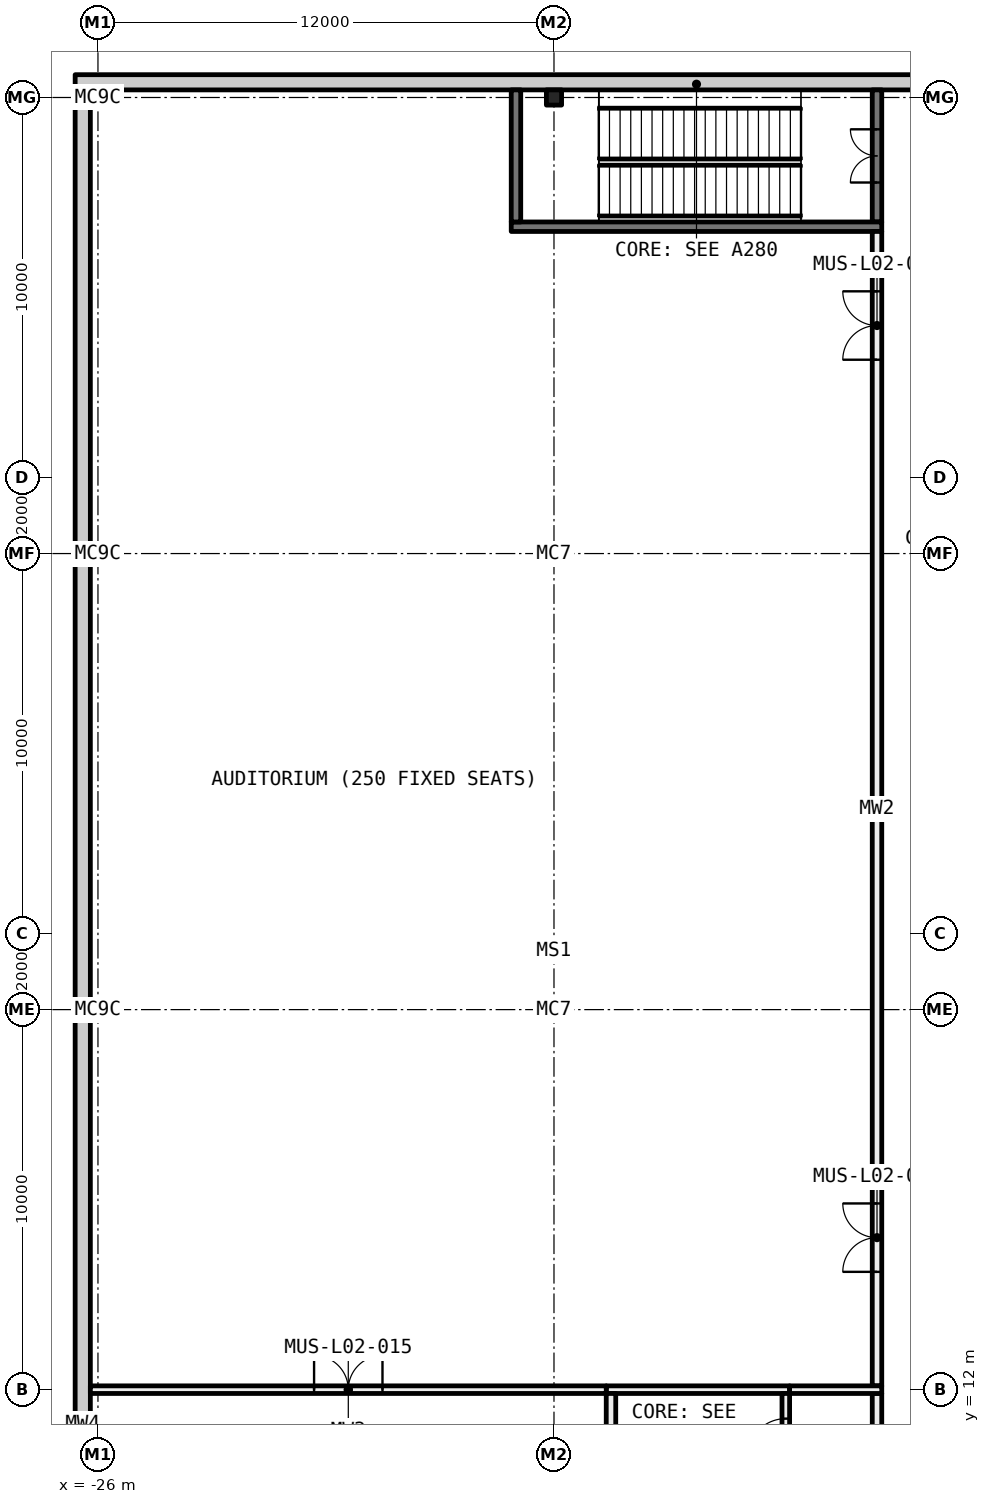
"""IFC4 building model, lengths in metres.
Left out: names, types, materials, properties, quantities, classifications, styles, units other than length and angle.
Written with IfcOpenShell. Run it as: python <this file> out.ifc"""

import sys

from ifc_helpers import new_model, si_unit, direction, frame, frame_2d, origin, origin_2d, place, context, subcontext, project, spatial, rectangle, i_section, extrude, element, fill, save


model = new_model("IFC4")
c1 = context("Model", 3, precision=1e-05, world=origin(), true_north=direction((0.0, 1.0)))
c2 = subcontext(c1, "Body", "Model", "MODEL_VIEW")
j1 = project(units=[si_unit("LENGTHUNIT", "METRE"), si_unit("PLANEANGLEUNIT", "RADIAN")], contexts=[c1])
p1 = place(None, origin())
s1 = spatial("IfcSite", under=j1, at=p1, CompositionType="ELEMENT")
p2 = place(p1, origin())
s2 = spatial("IfcBuilding", under=s1, at=p2, CompositionType="ELEMENT")
p3 = place(p2, frame((0.0, 0.0, 12.0)))
s3 = spatial("IfcBuildingStorey", under=s2, at=p3, CompositionType="ELEMENT", Elevation=12.0)
for number, where, z_axis, x_axis in (
    (1, (-26.0, 22.0, 0.0), (0.0, 0.0, 1.0), (1.0, 0.0, 0.0)),
    (2, (-26.0, 34.0, 0.0), (0.0, 0.0, 1.0), (1.0, 0.0, 0.0)),
    (3, (-26.0, 46.0, 0.0), (0.0, 0.0, 1.0), (1.0, 0.0, 0.0)),
):
    element("IfcColumn", number, at=place(p3, frame(where, z_axis=z_axis, x_axis=x_axis)), inside=s3, PredefinedType="COLUMN", context=c2, shape_type="SweptSolid", body=[
        extrude(i_section(OverallWidth=0.4, OverallDepth=0.4, WebThickness=0.013, FlangeThickness=0.021, FilletRadius=0.022, at=origin_2d()), origin(), (0.0, 0.0, 1.0), 5.6),
    ])
for number, where, z_axis, x_axis in (
    (4, (-14.0, 22.0, 0.0), (0.0, 0.0, 1.0), (1.0, 0.0, 0.0)),
    (5, (-14.0, 34.0, 0.0), (0.0, 0.0, 1.0), (1.0, 0.0, 0.0)),
):
    element("IfcColumn", number, at=place(p3, frame(where, z_axis=z_axis, x_axis=x_axis)), inside=s3, PredefinedType="COLUMN", context=c2, shape_type="SweptSolid", body=[
        extrude(i_section(OverallWidth=0.35, OverallDepth=0.35, WebThickness=0.012, FlangeThickness=0.019, FilletRadius=0.013, at=origin_2d()), origin(), (0.0, 0.0, 1.0), 5.6),
    ])
p4 = place(p3, frame((-14.0, 46.0, 0.0), z_axis=(0.0, 0.0, 1.0), x_axis=(1.0, 0.0, 0.0)))
e6 = element("IfcColumn", 6, at=p4, inside=s3, PredefinedType="COLUMN", context=c2, shape_type="SweptSolid", body=[
    extrude(i_section(OverallWidth=0.4, OverallDepth=0.4, WebThickness=0.013, FlangeThickness=0.021, FilletRadius=0.022, at=origin_2d()), origin(), (0.0, 0.0, 1.0), 5.6),
])
p5 = place(p3, frame((-12.625, 12.0, 0.0), z_axis=(0.0, 0.0, 1.0), x_axis=(1.0, 0.0, 0.0)))
e7 = element("IfcWall", 7, at=p5, inside=s3, PredefinedType="PARTITIONING", context=c2, shape_type="SweptSolid", body=[
    extrude(rectangle(XDim=4.825, YDim=0.2, at=frame_2d((2.413, 0.0))), origin(), (0.0, 0.0, 1.0), 5.6),
])
p6 = place(p3, frame((-12.5, 9.575, 0.0), z_axis=(0.0, 0.0, 1.0), x_axis=(0.0, 1.0, 0.0)))
e8 = element("IfcWall", 8, at=p6, inside=s3, PredefinedType="PARTITIONING", context=c2, shape_type="SweptSolid", body=[
    extrude(rectangle(XDim=2.325, YDim=0.25, at=frame_2d((1.163, 0.0))), origin(), (0.0, 0.0, 1.0), 5.6),
])
p7 = place(p3, frame((-26.2, 12.0, 0.0), z_axis=(0.0, 0.0, 1.0), x_axis=(1.0, 0.0, 0.0)))
e9 = element("IfcWall", 9, at=p7, inside=s3, PredefinedType="PARTITIONING", context=c2, shape_type="SweptSolid", body=[
    extrude(rectangle(XDim=13.575, YDim=0.2, at=frame_2d((6.788, 0.0))), origin(), (0.0, 0.0, 1.0), 5.6),
])
p8 = place(p7, frame((5.887, 0.0, 0.0)))
e10 = element("IfcOpeningElement", 10, at=p8, cuts=e9, PredefinedType="OPENING", context=c2, shape_type="SweptSolid", body=[
    extrude(rectangle(XDim=1.8, YDim=2.1, at=frame_2d((0.9, 1.05))), frame((0.0, 0.11, 0.0), z_axis=(0.0, -1.0, 0.0), x_axis=(1.0, 0.0, 0.0)), (0.0, 0.0, 1.0), 0.22),
])
p9 = place(p3, frame((-5.5, 12.1, 0.0), z_axis=(0.0, 0.0, 1.0), x_axis=(0.0, 1.0, 0.0)))
e11 = element("IfcWall", 11, at=p9, inside=s3, PredefinedType="PARTITIONING", context=c2, shape_type="SweptSolid", body=[
    extrude(rectangle(XDim=30.375, YDim=0.25, at=frame_2d((15.188, 0.0))), origin(), (0.0, 0.0, 1.0), 5.6),
])
p10 = place(p9, frame((3.0, 0.0, 0.0)))
e12 = element("IfcOpeningElement", 12, at=p10, cuts=e11, PredefinedType="OPENING", context=c2, shape_type="SweptSolid", body=[
    extrude(rectangle(XDim=1.8, YDim=2.1, at=frame_2d((0.9, 1.05))), frame((0.0, 0.135, 0.0), z_axis=(0.0, -1.0, 0.0), x_axis=(1.0, 0.0, 0.0)), (0.0, 0.0, 1.0), 0.27),
])
p11 = place(p9, frame((27.0, 0.0, 0.0)))
e13 = element("IfcOpeningElement", 13, at=p11, cuts=e11, PredefinedType="OPENING", context=c2, shape_type="SweptSolid", body=[
    extrude(rectangle(XDim=1.8, YDim=2.1, at=frame_2d((0.9, 1.05))), frame((0.0, 0.135, 0.0), z_axis=(0.0, -1.0, 0.0), x_axis=(1.0, 0.0, 0.0)), (0.0, 0.0, 1.0), 0.27),
])
p12 = place(p3, frame((-5.5, 42.725, 0.0), z_axis=(0.0, 0.0, 1.0), x_axis=(0.0, 1.0, 0.0)))
e14 = element("IfcWall", 14, at=p12, inside=s3, PredefinedType="SHEAR", context=c2, shape_type="SweptSolid", body=[
    extrude(rectangle(XDim=3.475, YDim=0.25, at=frame_2d((1.737, 0.0))), origin(), (0.0, 0.0, 1.0), 5.6),
])
p13 = place(p12, frame((1.038, 0.0, 0.0)))
e15 = element("IfcOpeningElement", 15, at=p13, cuts=e14, PredefinedType="OPENING", context=c2, shape_type="SweptSolid", body=[
    extrude(rectangle(XDim=1.4, YDim=2.1, at=frame_2d((0.7, 1.05))), frame((0.0, 0.135, 0.0), z_axis=(0.0, -1.0, 0.0), x_axis=(1.0, 0.0, 0.0)), (0.0, 0.0, 1.0), 0.27),
])
p14 = place(p3, frame((-5.5, 4.625, 0.0), z_axis=(0.0, 0.0, 1.0), x_axis=(0.0, 1.0, 0.0)))
e16 = element("IfcWall", 16, at=p14, inside=s3, PredefinedType="PARTITIONING", context=c2, shape_type="SweptSolid", body=[
    extrude(rectangle(XDim=7.275, YDim=0.25, at=frame_2d((3.637, 0.0))), origin(), (0.0, 0.0, 1.0), 5.6),
])
p15 = place(p14, frame((3.138, 0.0, 0.0)))
e17 = element("IfcOpeningElement", 17, at=p15, cuts=e16, PredefinedType="OPENING", context=c2, shape_type="SweptSolid", body=[
    extrude(rectangle(XDim=1.0, YDim=2.1, at=frame_2d((0.5, 1.05))), frame((0.0, 0.135, 0.0), z_axis=(0.0, -1.0, 0.0), x_axis=(1.0, 0.0, 0.0)), (0.0, 0.0, 1.0), 0.27),
])
p16 = place(p3, frame((-15.125, 42.6, 0.0), z_axis=(0.0, 0.0, 1.0), x_axis=(1.0, 0.0, 0.0)))
e18 = element("IfcWall", 18, at=p16, inside=s3, PredefinedType="SHEAR", context=c2, shape_type="SweptSolid", body=[
    extrude(rectangle(XDim=9.75, YDim=0.25, at=frame_2d((4.875, 0.0))), origin(), (0.0, 0.0, 1.0), 5.6),
])
p17 = place(p3, frame((-15.0, 42.725, 0.0), z_axis=(0.0, 0.0, 1.0), x_axis=(0.0, 1.0, 0.0)))
e19 = element("IfcWall", 19, at=p17, inside=s3, PredefinedType="SHEAR", context=c2, shape_type="SweptSolid", body=[
    extrude(rectangle(XDim=3.475, YDim=0.25, at=frame_2d((1.737, 0.0))), origin(), (0.0, 0.0, 1.0), 5.6),
])
p18 = place(p3, frame((-7.9, 9.575, 0.0), z_axis=(0.0, 0.0, 1.0), x_axis=(0.0, 1.0, 0.0)))
e20 = element("IfcWall", 20, at=p18, inside=s3, PredefinedType="PARTITIONING", context=c2, shape_type="SweptSolid", body=[
    extrude(rectangle(XDim=2.325, YDim=0.2, at=frame_2d((1.163, 0.0))), origin(), (0.0, 0.0, 1.0), 5.6),
])
p19 = place(p18, frame((0.663, 0.0, 0.0)))
e21 = element("IfcOpeningElement", 21, at=p19, cuts=e20, PredefinedType="OPENING", context=c2, shape_type="SweptSolid", body=[
    extrude(rectangle(XDim=1.0, YDim=2.1, at=frame_2d((0.5, 1.05))), frame((0.0, 0.11, 0.0), z_axis=(0.0, -1.0, 0.0), x_axis=(1.0, 0.0, 0.0)), (0.0, 0.0, 1.0), 0.22),
])
p20 = place(p3, frame((-7.8, 12.0, 0.0), z_axis=(0.0, 0.0, 1.0), x_axis=(1.0, 0.0, 0.0)))
e22 = element("IfcWall", 22, at=p20, inside=s3, PredefinedType="PARTITIONING", context=c2, shape_type="SweptSolid", body=[
    extrude(rectangle(XDim=2.425, YDim=0.2, at=frame_2d((1.212, 0.0))), origin(), (0.0, 0.0, 1.0), 5.6),
])
p21 = place(p3, frame((-26.4, -26.2, -0.4), z_axis=(0.0, 0.0, 1.0), x_axis=(0.0, 1.0, 0.0)))
e23 = element("IfcWall", 23, at=p21, inside=s3, PredefinedType="STANDARD", context=c2, shape_type="SweptSolid", body=[
    extrude(rectangle(XDim=72.4, YDim=0.4, at=frame_2d((36.2, 0.0))), origin(), (0.0, 0.0, 1.0), 6.0),
])
p22 = place(p3, frame((-26.6, 46.4, -0.4), z_axis=(0.0, 0.0, 1.0), x_axis=(1.0, 0.0, 0.0)))
e24 = element("IfcWall", 24, at=p22, inside=s3, PredefinedType="STANDARD", context=c2, shape_type="SweptSolid", body=[
    extrude(rectangle(XDim=25.2, YDim=0.4, at=frame_2d((12.6, 0.0))), origin(), (0.0, 0.0, 1.0), 6.0),
])
p23 = place(p13, origin())
e25 = element("IfcDoor", 25, at=p23, inside=s3, OperationType="DOUBLE_DOOR_SINGLE_SWING", PredefinedType="DOOR", context=c2, shape_type="SweptSolid", body=[
    extrude(rectangle(XDim=1.4, YDim=2.1, at=frame_2d((0.7, 1.05))), frame((0.0, 0.025, 0.0), z_axis=(0.0, -1.0, 0.0), x_axis=(1.0, 0.0, 0.0)), (0.0, 0.0, 1.0), 0.05),
])
fill(e15, e25)
p24 = place(p19, origin())
e26 = element("IfcDoor", 26, at=p24, inside=s3, OperationType="SINGLE_SWING_RIGHT", PredefinedType="DOOR", context=c2, shape_type="SweptSolid", body=[
    extrude(rectangle(XDim=1.0, YDim=2.1, at=frame_2d((0.5, 1.05))), frame((0.0, 0.025, 0.0), z_axis=(0.0, -1.0, 0.0), x_axis=(1.0, 0.0, 0.0)), (0.0, 0.0, 1.0), 0.05),
])
fill(e21, e26)
p25 = place(p8, origin())
e27 = element("IfcDoor", 27, at=p25, inside=s3, OperationType="DOUBLE_DOOR_SINGLE_SWING", PredefinedType="DOOR", context=c2, shape_type="SweptSolid", body=[
    extrude(rectangle(XDim=1.8, YDim=2.1, at=frame_2d((0.9, 1.05))), frame((0.0, 0.025, 0.0), z_axis=(0.0, -1.0, 0.0), x_axis=(1.0, 0.0, 0.0)), (0.0, 0.0, 1.0), 0.05),
])
fill(e10, e27)
p26 = place(p10, origin())
e28 = element("IfcDoor", 28, at=p26, inside=s3, OperationType="DOUBLE_DOOR_SINGLE_SWING", PredefinedType="DOOR", context=c2, shape_type="SweptSolid", body=[
    extrude(rectangle(XDim=1.8, YDim=2.1, at=frame_2d((0.9, 1.05))), frame((0.0, 0.025, 0.0), z_axis=(0.0, -1.0, 0.0), x_axis=(1.0, 0.0, 0.0)), (0.0, 0.0, 1.0), 0.05),
])
fill(e12, e28)
p27 = place(p11, origin())
e29 = element("IfcDoor", 29, at=p27, inside=s3, OperationType="DOUBLE_DOOR_SINGLE_SWING", PredefinedType="DOOR", context=c2, shape_type="SweptSolid", body=[
    extrude(rectangle(XDim=1.8, YDim=2.1, at=frame_2d((0.9, 1.05))), frame((0.0, 0.025, 0.0), z_axis=(0.0, -1.0, 0.0), x_axis=(1.0, 0.0, 0.0)), (0.0, 0.0, 1.0), 0.05),
])
fill(e13, e29)
save(model, sys.argv[1])
